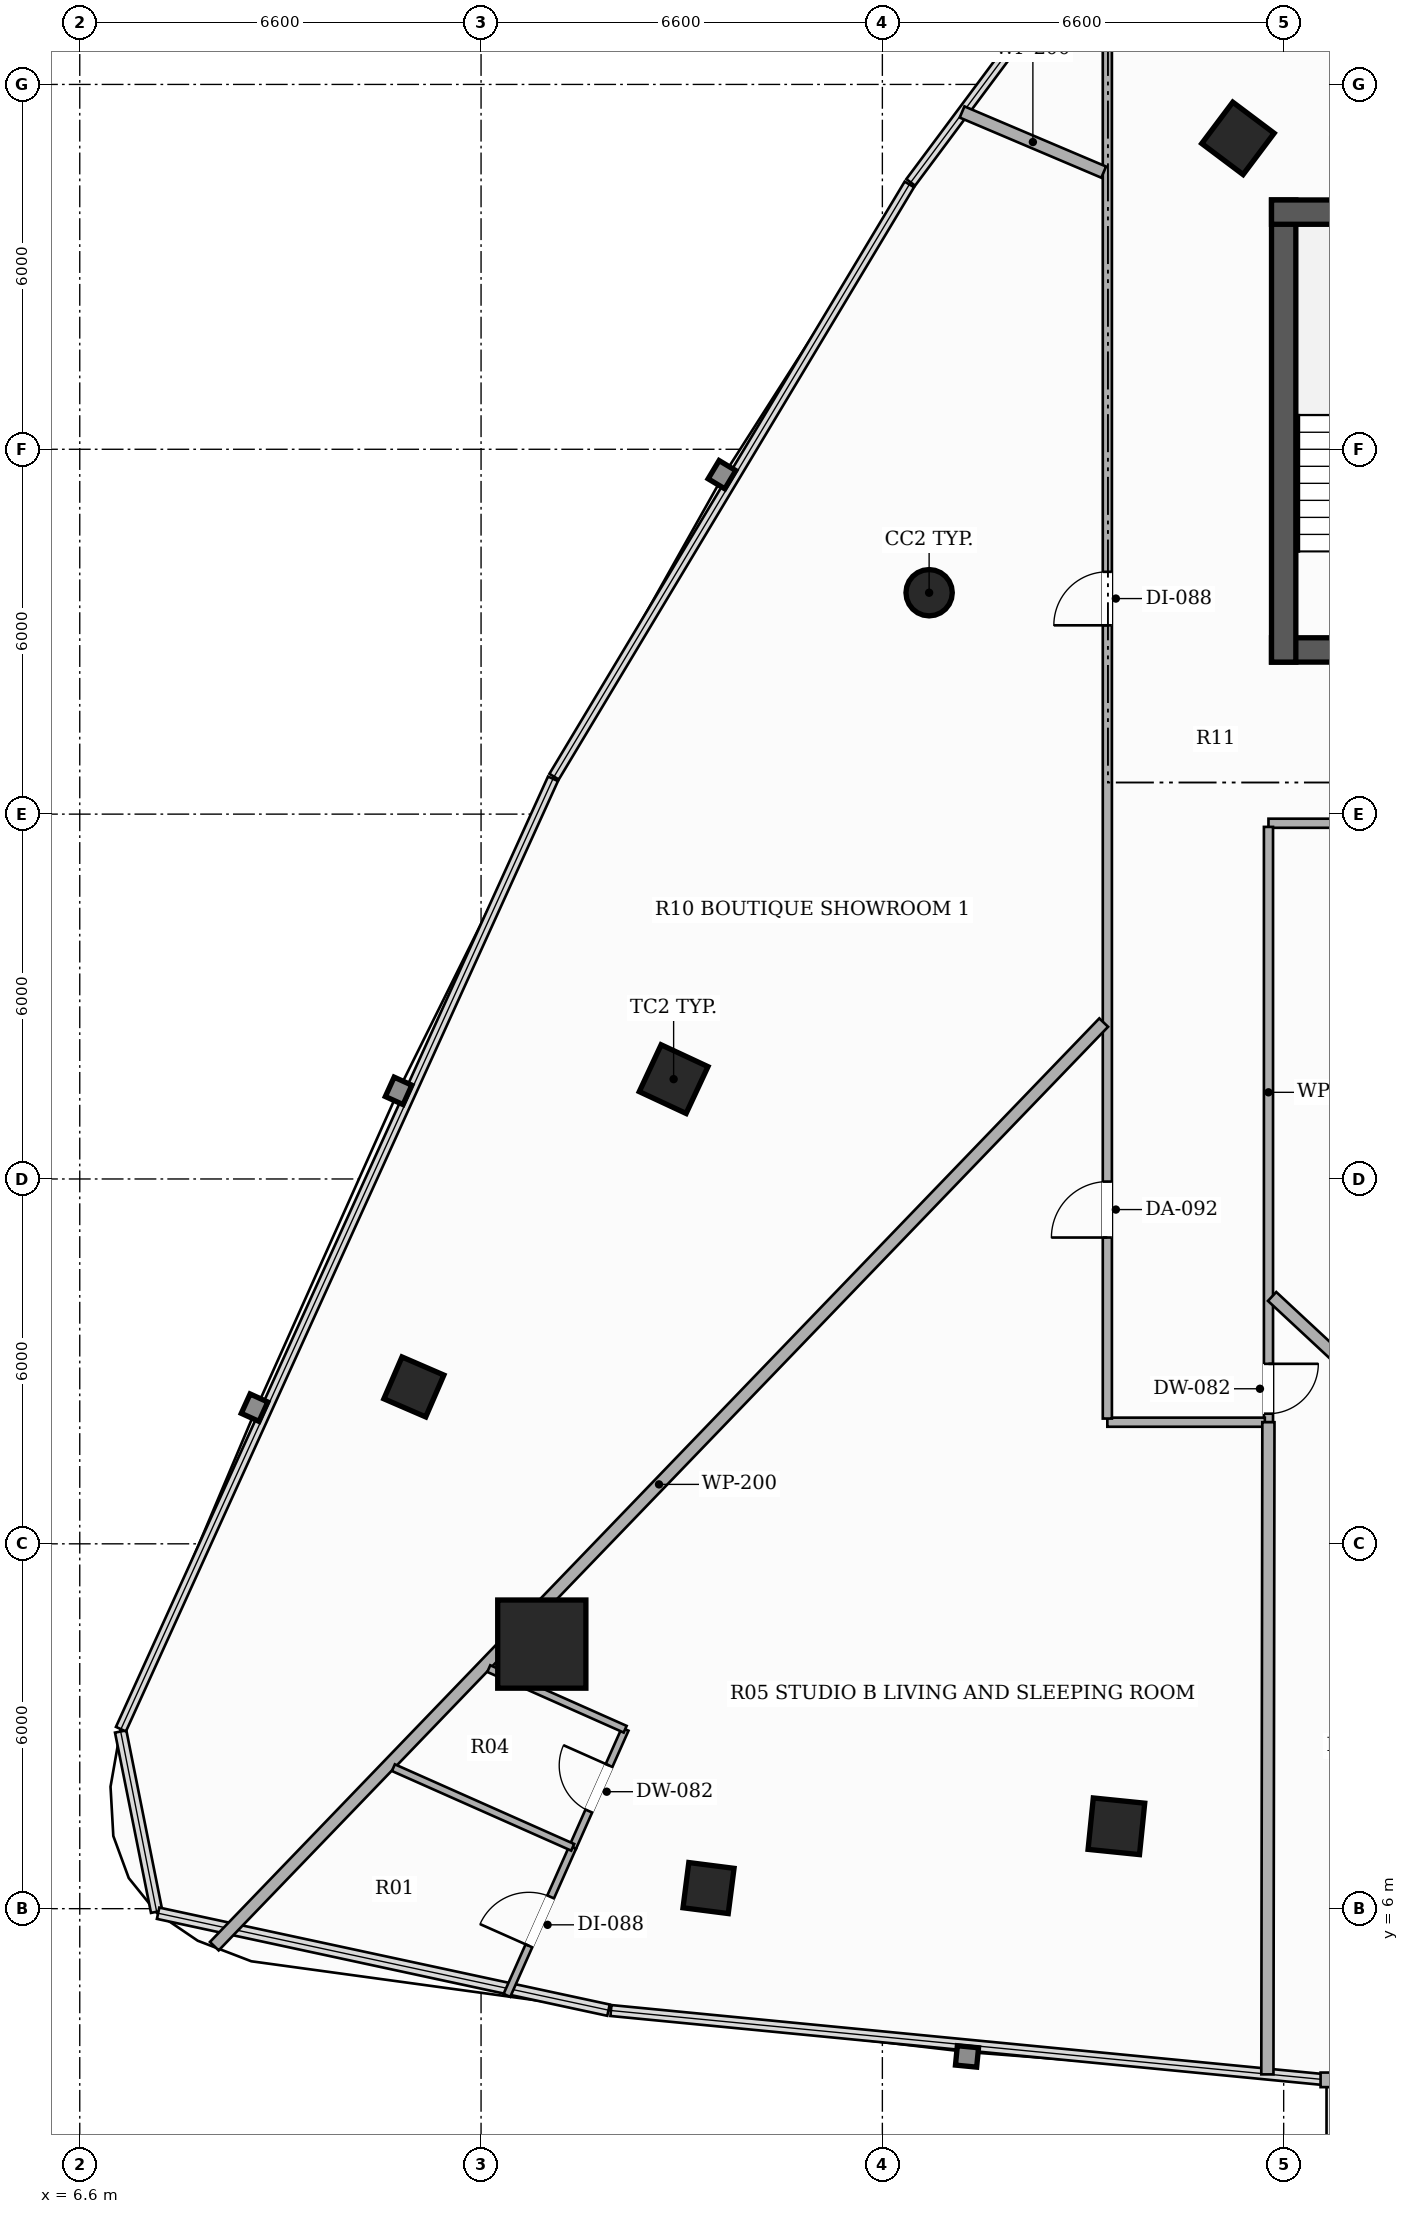
"""IFC4 building model, lengths in metres.
Left out: names, types, materials, properties, quantities, classifications, styles, units other than length and angle.
Written with IfcOpenShell. Run it as: python <this file> out.ifc"""

import sys

from ifc_helpers import new_model, si_unit, direction, frame, frame_2d, origin, origin_2d, place, context, subcontext, project, spatial, rectangle, hollow_rectangle, hollow_circle, extrude, element, fill, save


model = new_model("IFC4")
c1 = context("Model", 3, precision=1e-05, world=origin(), true_north=direction((0.0, 1.0)))
c2 = subcontext(c1, "Body", "Model", "MODEL_VIEW")
j1 = project(units=[si_unit("LENGTHUNIT", "METRE"), si_unit("PLANEANGLEUNIT", "RADIAN")], contexts=[c1])
p1 = place(None, origin())
s1 = spatial("IfcSite", under=j1, at=p1, CompositionType="ELEMENT")
p2 = place(p1, origin())
s2 = spatial("IfcBuilding", under=s1, at=p2, CompositionType="ELEMENT")
p3 = place(p2, frame((0.0, 0.0, 129.8)))
s3 = spatial("IfcBuildingStorey", under=s2, at=p3, CompositionType="ELEMENT", Elevation=129.8)
p4 = place(p3, frame((26.2, 26.7, 0.0), z_axis=(0.0, 0.0, 1.0), x_axis=(1.0, 0.0, 0.0)))
e1 = element("IfcWall", 1, at=p4, inside=s3, PredefinedType="SHEAR", context=c2, shape_type="SweptSolid", body=[
    extrude(rectangle(XDim=13.6, YDim=0.4, at=frame_2d((6.8, 0.0))), origin(), (0.0, 0.0, 1.0), 3.3),
])
p5 = place(p4, frame((4.35, 0.0, 0.0)))
e2 = element("IfcOpeningElement", 2, at=p5, cuts=e1, PredefinedType="OPENING", context=c2, shape_type="SweptSolid", body=[
    extrude(rectangle(XDim=1.05, YDim=2.15, at=frame_2d((0.525, 1.075))), frame((0.0, 0.21, 0.0), z_axis=(0.0, -1.0, 0.0), x_axis=(1.0, 0.0, 0.0)), (0.0, 0.0, 1.0), 0.42),
])
p6 = place(p4, frame((8.3, 0.0, 0.0)))
e3 = element("IfcOpeningElement", 3, at=p6, cuts=e1, PredefinedType="OPENING", context=c2, shape_type="SweptSolid", body=[
    extrude(rectangle(XDim=1.05, YDim=2.15, at=frame_2d((0.525, 1.075))), frame((0.0, 0.21, 0.0), z_axis=(0.0, -1.0, 0.0), x_axis=(1.0, 0.0, 0.0)), (0.0, 0.0, 1.0), 0.42),
])
p7 = place(p3, frame((26.4, 26.5, 0.0), z_axis=(0.0, 0.0, 1.0), x_axis=(0.0, 1.0, 0.0)))
e4 = element("IfcWall", 4, at=p7, inside=s3, PredefinedType="SHEAR", context=c2, shape_type="SweptSolid", body=[
    extrude(rectangle(XDim=7.6, YDim=0.4, at=frame_2d((3.8, 0.0))), origin(), (0.0, 0.0, 1.0), 3.3),
])
p8 = place(p3, frame((26.2, 33.9, 0.0), z_axis=(0.0, 0.0, 1.0), x_axis=(1.0, 0.0, 0.0)))
e5 = element("IfcWall", 5, at=p8, inside=s3, PredefinedType="SHEAR", context=c2, shape_type="SweptSolid", body=[
    extrude(rectangle(XDim=3.68, YDim=0.4, at=frame_2d((1.84, 0.0))), origin(), (0.0, 0.0, 1.0), 3.3),
])
p9 = place(p3, frame((14.199, 10.351, 0.0), z_axis=(0.0, 0.0, 1.0), x_axis=(1.0, 0.0, 0.0)))
e6 = element("IfcColumn", 6, at=p9, inside=s3, PredefinedType="COLUMN", context=c2, shape_type="SweptSolid", body=[
    extrude(hollow_rectangle(XDim=1.45, YDim=1.45, WallThickness=0.045, at=origin_2d()), origin(), (0.0, 0.0, 1.0), 3.3),
])
p10 = place(p3, frame((25.648, 35.113, 0.0), z_axis=(0.0, 0.0, 1.0), x_axis=(0.600420225326, 0.799684658487, 0.0)))
e7 = element("IfcColumn", 7, at=p10, inside=s3, PredefinedType="COLUMN", context=c2, shape_type="SweptSolid", body=[
    extrude(hollow_rectangle(XDim=0.85, YDim=0.85, WallThickness=0.028, at=origin_2d()), origin(), (0.0, 0.0, 1.0), 3.3),
])
p11 = place(p3, frame((20.569, 27.641, 0.0), z_axis=(0.0, 0.0, 1.0), x_axis=(1.0, 0.0, 0.0)))
e8 = element("IfcColumn", 8, at=p11, inside=s3, PredefinedType="COLUMN", context=c2, shape_type="SweptSolid", body=[
    extrude(hollow_circle(Radius=0.381, WallThickness=0.022, at=origin_2d()), origin(), (0.0, 0.0, 1.0), 3.3),
])
for number, where, z_axis, x_axis in (
    (9, (16.367, 19.642, 0.0), (0.0, 0.0, 1.0), (0.423, 0.906, 0.0)),
    (10, (23.649, 7.355, 0.0), (0.0, 0.0, 1.0), (-0.995, 0.101, 0.0)),
):
    element("IfcColumn", number, at=place(p3, frame(where, z_axis=z_axis, x_axis=x_axis)), inside=s3, PredefinedType="COLUMN", context=c2, shape_type="SweptSolid", body=[
        extrude(hollow_rectangle(XDim=0.85, YDim=0.85, WallThickness=0.028, at=origin_2d()), origin(), (0.0, 0.0, 1.0), 3.3),
    ])
for number, where, z_axis, x_axis in (
    (11, (12.095, 14.58, 0.0), (0.0, 0.0, 1.0), (0.397, 0.918, 0.0)),
    (12, (16.941, 6.339, 0.0), (0.0, 0.0, 1.0), (-0.992, 0.127, 0.0)),
):
    element("IfcColumn", number, at=place(p3, frame(where, z_axis=z_axis, x_axis=x_axis)), inside=s3, PredefinedType="COLUMN", context=c2, shape_type="SweptSolid", body=[
        extrude(hollow_rectangle(XDim=0.75, YDim=0.75, WallThickness=0.025, at=origin_2d()), origin(), (0.0, 0.0, 1.0), 3.3),
    ])
p12 = place(p3, frame((27.007, 3.185, 0.0), z_axis=(0.0, 0.0, 1.0), x_axis=(1.0, 0.0, 0.0)))
e13 = element("IfcWall", 13, at=p12, inside=s3, PredefinedType="SOLIDWALL", context=c2, shape_type="SweptSolid", body=[
    extrude(rectangle(XDim=11.986, YDim=0.24, at=frame_2d((5.993, 0.0))), origin(), (0.0, 0.0, 1.0), 2.624),
])
p13 = place(p12, frame((9.488, 0.0, 0.0)))
e14 = element("IfcOpeningElement", 14, at=p13, cuts=e13, PredefinedType="OPENING", context=c2, shape_type="SweptSolid", body=[
    extrude(rectangle(XDim=1.8, YDim=2.2, at=frame_2d((0.9, 1.1))), frame((0.0, 0.13, 0.0), z_axis=(0.0, -1.0, 0.0), x_axis=(1.0, 0.0, 0.0)), (0.0, 0.0, 1.0), 0.26),
])
p14 = place(p3, frame((31.821, 23.85, 0.0), z_axis=(0.0, 0.0, 1.0), x_axis=(-1.0, 0.0, 0.0)))
e15 = element("IfcWall", 15, at=p14, inside=s3, PredefinedType="PARTITIONING", context=c2, shape_type="SweptSolid", body=[
    extrude(rectangle(XDim=5.671, YDim=0.15, at=frame_2d((2.835, 0.0))), origin(), (0.0, 0.0, 1.0), 2.721),
])
p15 = place(p14, frame((0.88, 0.0, 0.0)))
e16 = element("IfcOpeningElement", 16, at=p15, cuts=e15, PredefinedType="OPENING", context=c2, shape_type="SweptSolid", body=[
    extrude(rectangle(XDim=0.88, YDim=2.1, at=frame_2d((0.44, 1.05))), frame((0.0, 0.085, 0.0), z_axis=(0.0, -1.0, 0.0), x_axis=(1.0, 0.0, 0.0)), (0.0, 0.0, 1.0), 0.17),
])
p16 = place(p3, frame((26.15, 23.79, 0.0), z_axis=(0.0, 0.0, 1.0), x_axis=(0.0, -1.0, 0.0)))
e17 = element("IfcWall", 17, at=p16, inside=s3, PredefinedType="PARTITIONING", context=c2, shape_type="SweptSolid", body=[
    extrude(rectangle(XDim=9.79, YDim=0.15, at=frame_2d((4.895, 0.0))), origin(), (0.0, 0.0, 1.0), 2.721),
])
p17 = place(p16, frame((8.83, 0.0, 0.0)))
e18 = element("IfcOpeningElement", 18, at=p17, cuts=e17, PredefinedType="OPENING", context=c2, shape_type="SweptSolid", body=[
    extrude(rectangle(XDim=0.82, YDim=2.1, at=frame_2d((0.41, 1.05))), frame((0.0, 0.085, 0.0), z_axis=(0.0, -1.0, 0.0), x_axis=(1.0, 0.0, 0.0)), (0.0, 0.0, 1.0), 0.17),
])
p18 = place(p3, frame((26.09, 14.0, 0.0), z_axis=(0.0, 0.0, 1.0), x_axis=(-1.0, 0.0, 0.0)))
e19 = element("IfcWall", 19, at=p18, inside=s3, PredefinedType="PARTITIONING", context=c2, shape_type="SweptSolid", body=[
    extrude(rectangle(XDim=2.59, YDim=0.15, at=frame_2d((1.295, 0.0))), origin(), (0.0, 0.0, 1.0), 2.721),
])
p19 = place(p3, frame((23.5, 14.06, 0.0), z_axis=(0.0, 0.0, 1.0), x_axis=(0.0, 1.0, 0.0)))
e20 = element("IfcWall", 20, at=p19, inside=s3, PredefinedType="PARTITIONING", context=c2, shape_type="SweptSolid", body=[
    extrude(rectangle(XDim=22.84, YDim=0.15, at=frame_2d((11.42, 0.0))), origin(), (0.0, 0.0, 1.0), 2.413),
])
p20 = place(p19, frame((13.045, 0.0, 0.0)))
e21 = element("IfcOpeningElement", 21, at=p20, cuts=e20, PredefinedType="OPENING", context=c2, shape_type="SweptSolid", body=[
    extrude(rectangle(XDim=0.88, YDim=2.1, at=frame_2d((0.44, 1.05))), frame((0.0, 0.085, 0.0), z_axis=(0.0, -1.0, 0.0), x_axis=(1.0, 0.0, 0.0)), (0.0, 0.0, 1.0), 0.17),
])
p21 = place(p19, frame((2.977, 0.0, 0.0)))
e22 = element("IfcOpeningElement", 22, at=p21, cuts=e20, PredefinedType="OPENING", context=c2, shape_type="SweptSolid", body=[
    extrude(rectangle(XDim=0.92, YDim=2.15, at=frame_2d((0.46, 1.075))), frame((0.0, 0.085, 0.0), z_axis=(0.0, -1.0, 0.0), x_axis=(1.0, 0.0, 0.0)), (0.0, 0.0, 1.0), 0.17),
])
p22 = place(p3, frame((23.44, 20.572, 0.0), z_axis=(0.0, 0.0, 1.0), x_axis=(-0.693655036552, -0.720307358193, 0.0)))
e23 = element("IfcWall", 23, at=p22, inside=s3, PredefinedType="PARTITIONING", context=c2, shape_type="SweptSolid", body=[
    extrude(rectangle(XDim=21.087, YDim=0.2, at=frame_2d((10.543, 0.0))), origin(), (0.0, 0.0, 1.0), 2.413),
])
p23 = place(p3, frame((21.111, 35.547, 0.0), z_axis=(0.0, 0.0, 1.0), x_axis=(0.920437694564, -0.390889307126, 0.0)))
e24 = element("IfcWall", 24, at=p23, inside=s3, PredefinedType="PARTITIONING", context=c2, shape_type="SweptSolid", body=[
    extrude(rectangle(XDim=2.53, YDim=0.2, at=frame_2d((1.265, 0.0))), origin(), (0.0, 0.0, 1.0), 3.06),
])
p24 = place(p3, frame((26.149, 14.0, 0.0), z_axis=(0.0, 0.0, 1.0), x_axis=(-0.001570678691, -0.999998766483, 0.0)))
e25 = element("IfcWall", 25, at=p24, inside=s3, PredefinedType="PARTITIONING", context=c2, shape_type="SweptSolid", body=[
    extrude(rectangle(XDim=10.725, YDim=0.2, at=frame_2d((5.363, 0.0))), origin(), (0.0, 0.0, 1.0), 2.413),
])
p25 = place(p3, frame((39.958, 3.278, 0.0), z_axis=(0.0, 0.0, 1.0), x_axis=(-0.732155976475, 0.681137009795, 0.0)))
e26 = element("IfcWall", 26, at=p25, inside=s3, PredefinedType="PARTITIONING", context=c2, shape_type="SweptSolid", body=[
    extrude(rectangle(XDim=18.778, YDim=0.2, at=frame_2d((9.389, 0.0))), origin(), (0.0, 0.0, 1.0), 2.413),
])
p26 = place(p3, frame((14.707, 7.009, 0.0), z_axis=(0.0, 0.0, 1.0), x_axis=(0.406127806348, 0.913816286193, 0.0)))
e27 = element("IfcWall", 27, at=p26, inside=s3, PredefinedType="PARTITIONING", context=c2, shape_type="SweptSolid", body=[
    extrude(rectangle(XDim=2.125, YDim=0.12, at=frame_2d((1.062, 0.0))), origin(), (0.0, 0.0, 1.0), 2.413),
])
p27 = place(p26, frame((0.653, 0.0, 0.0)))
e28 = element("IfcOpeningElement", 28, at=p27, cuts=e27, PredefinedType="OPENING", context=c2, shape_type="SweptSolid", body=[
    extrude(rectangle(XDim=0.82, YDim=2.1, at=frame_2d((0.41, 1.05))), frame((0.0, 0.07, 0.0), z_axis=(0.0, -1.0, 0.0), x_axis=(1.0, 0.0, 0.0)), (0.0, 0.0, 1.0), 0.14),
])
p28 = place(p3, frame((15.57, 8.951, 0.0), z_axis=(0.0, 0.0, 1.0), x_axis=(-0.91379514288, 0.406175376961, 0.0)))
e29 = element("IfcWall", 29, at=p28, inside=s3, PredefinedType="PARTITIONING", context=c2, shape_type="SweptSolid", body=[
    extrude(rectangle(XDim=2.455, YDim=0.12, at=frame_2d((1.228, 0.0))), origin(), (0.0, 0.0, 1.0), 2.413),
])
p29 = place(p3, frame((13.625, 4.574, 0.0), z_axis=(0.0, 0.0, 1.0), x_axis=(0.406070456553, 0.913841772034, 0.0)))
e30 = element("IfcWall", 30, at=p29, inside=s3, PredefinedType="PARTITIONING", context=c2, shape_type="SweptSolid", body=[
    extrude(rectangle(XDim=2.665, YDim=0.12, at=frame_2d((1.332, 0.0))), origin(), (0.0, 0.0, 1.0), 3.06),
])
p30 = place(p29, frame((0.892, 0.0, 0.0)))
e31 = element("IfcOpeningElement", 31, at=p30, cuts=e30, PredefinedType="OPENING", context=c2, shape_type="SweptSolid", body=[
    extrude(rectangle(XDim=0.88, YDim=2.1, at=frame_2d((0.44, 1.05))), frame((0.0, 0.07, 0.0), z_axis=(0.0, -1.0, 0.0), x_axis=(1.0, 0.0, 0.0)), (0.0, 0.0, 1.0), 0.14),
])
p31 = place(p3, frame((14.707, 7.009, 0.0), z_axis=(0.0, 0.0, 1.0), x_axis=(-0.913880174296, 0.40598402312, 0.0)))
e32 = element("IfcWall", 32, at=p31, inside=s3, PredefinedType="PARTITIONING", context=c2, shape_type="SweptSolid", body=[
    extrude(rectangle(XDim=3.227, YDim=0.12, at=frame_2d((1.613, 0.0))), origin(), (0.0, 0.0, 1.0), 3.06),
])
p32 = place(p20, origin())
e33 = element("IfcDoor", 33, at=p32, inside=s3, OperationType="SINGLE_SWING_LEFT", PredefinedType="DOOR", context=c2, shape_type="SweptSolid", body=[
    extrude(rectangle(XDim=0.88, YDim=2.1, at=frame_2d((0.44, 1.05))), frame((0.0, 0.025, 0.0), z_axis=(0.0, -1.0, 0.0), x_axis=(1.0, 0.0, 0.0)), (0.0, 0.0, 1.0), 0.05),
])
fill(e21, e33)
p33 = place(p21, origin())
e34 = element("IfcDoor", 34, at=p33, inside=s3, OperationType="SINGLE_SWING_LEFT", PredefinedType="DOOR", context=c2, shape_type="SweptSolid", body=[
    extrude(rectangle(XDim=0.92, YDim=2.15, at=frame_2d((0.46, 1.075))), frame((0.0, 0.025, 0.0), z_axis=(0.0, -1.0, 0.0), x_axis=(1.0, 0.0, 0.0)), (0.0, 0.0, 1.0), 0.05),
])
fill(e22, e34)
p34 = place(p27, origin())
e35 = element("IfcDoor", 35, at=p34, inside=s3, OperationType="SINGLE_SWING_RIGHT", PredefinedType="DOOR", context=c2, shape_type="SweptSolid", body=[
    extrude(rectangle(XDim=0.82, YDim=2.1, at=frame_2d((0.41, 1.05))), frame((0.0, 0.025, 0.0), z_axis=(0.0, -1.0, 0.0), x_axis=(1.0, 0.0, 0.0)), (0.0, 0.0, 1.0), 0.05),
])
fill(e28, e35)
p35 = place(p30, origin())
e36 = element("IfcDoor", 36, at=p35, inside=s3, OperationType="SINGLE_SWING_LEFT", PredefinedType="DOOR", context=c2, shape_type="SweptSolid", body=[
    extrude(rectangle(XDim=0.88, YDim=2.1, at=frame_2d((0.44, 1.05))), frame((0.0, 0.025, 0.0), z_axis=(0.0, -1.0, 0.0), x_axis=(1.0, 0.0, 0.0)), (0.0, 0.0, 1.0), 0.05),
])
fill(e31, e36)
p36 = place(p17, origin())
e37 = element("IfcDoor", 37, at=p36, inside=s3, OperationType="SINGLE_SWING_LEFT", PredefinedType="DOOR", context=c2, shape_type="SweptSolid", body=[
    extrude(rectangle(XDim=0.82, YDim=2.1, at=frame_2d((0.41, 1.05))), frame((0.0, 0.025, 0.0), z_axis=(0.0, -1.0, 0.0), x_axis=(1.0, 0.0, 0.0)), (0.0, 0.0, 1.0), 0.05),
])
fill(e18, e37)
save(model, sys.argv[1])
